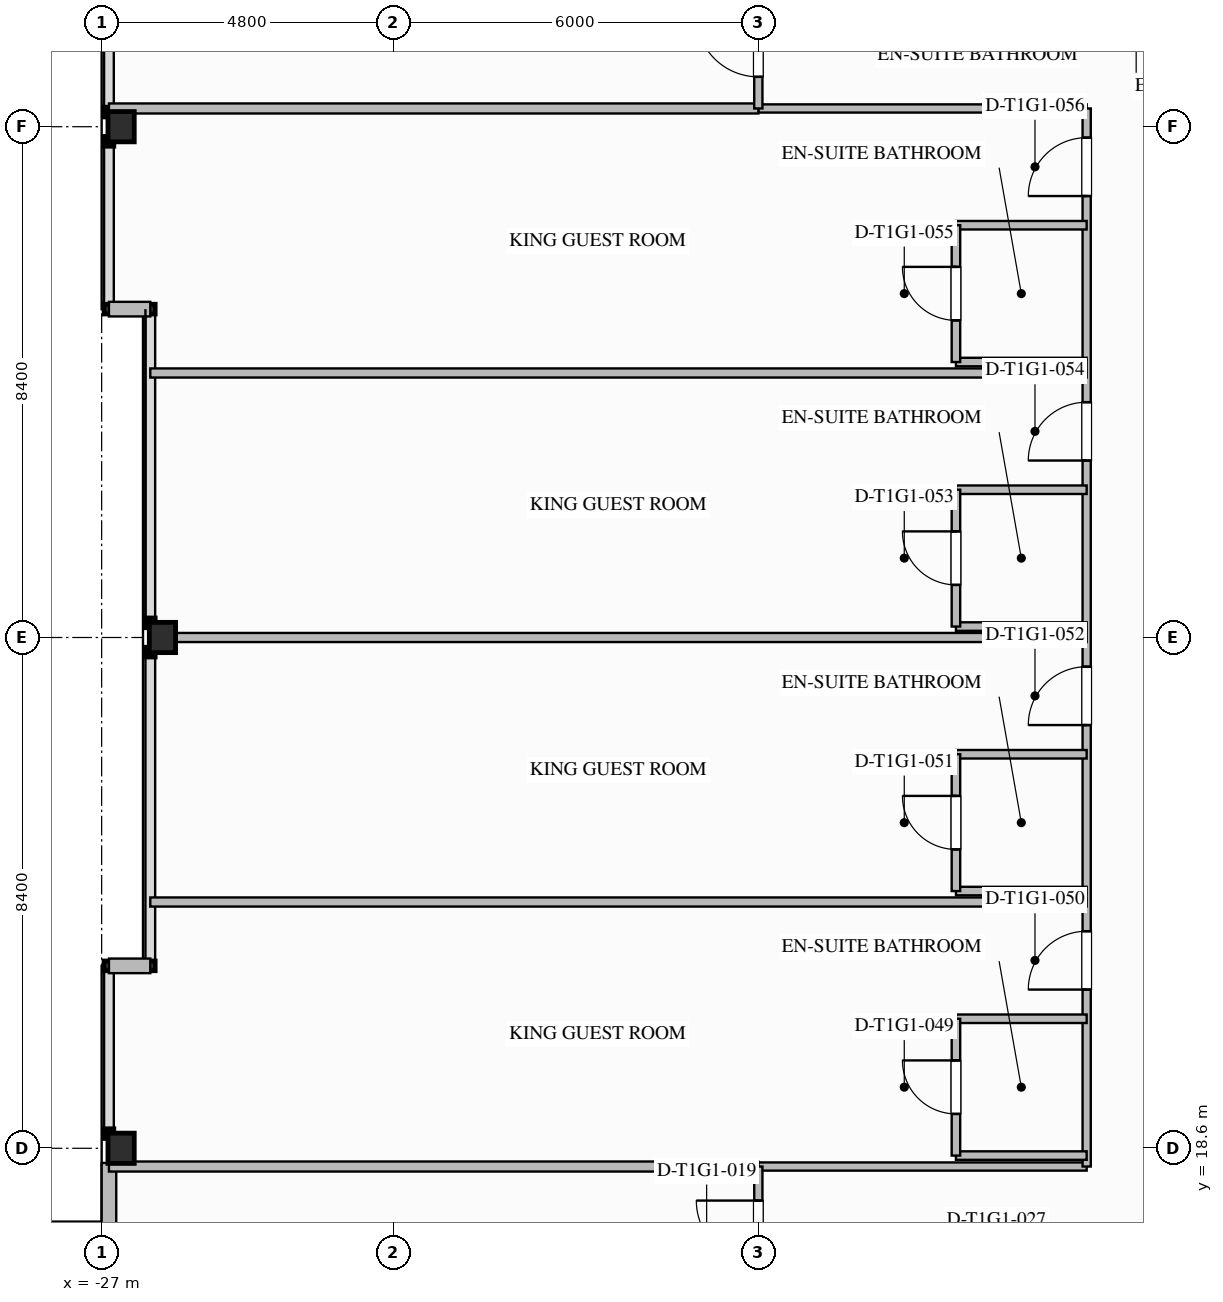
"""IFC4 building model, lengths in metres.
Left out: names, types, materials, properties, quantities, classifications, styles, units other than length and angle.
Written with IfcOpenShell. Run it as: python <this file> out.ifc"""

import sys

from ifc_helpers import new_model, si_unit, direction, frame, frame_2d, origin, origin_2d, place, context, subcontext, project, spatial, rectangle, i_section, extrude, element, fill, save


model = new_model("IFC4")
c1 = context("Model", 3, precision=1e-05, world=origin(), true_north=direction((0.0, 1.0)))
c2 = subcontext(c1, "Body", "Model", "MODEL_VIEW")
j1 = project(units=[si_unit("LENGTHUNIT", "METRE"), si_unit("PLANEANGLEUNIT", "RADIAN")], contexts=[c1])
p1 = place(None, origin())
s1 = spatial("IfcSite", under=j1, at=p1, CompositionType="ELEMENT")
p2 = place(p1, origin())
s2 = spatial("IfcBuilding", under=s1, at=p2, CompositionType="ELEMENT")
p3 = place(p2, frame((0.0, 0.0, 36.7)))
s3 = spatial("IfcBuildingStorey", under=s2, at=p3, CompositionType="ELEMENT", Elevation=36.7)
for number, where, z_axis, x_axis in (
    (1, (-26.68, 18.6, 0.0), (0.0, 0.0, 1.0), (1.0, 0.0, 0.0)),
    (2, (-26.0, 27.0, 0.0), (0.0, 0.0, 1.0), (1.0, 0.0, 0.0)),
    (3, (-26.68, 35.4, 0.0), (0.0, 0.0, 1.0), (1.0, 0.0, 0.0)),
):
    element("IfcColumn", number, at=place(p3, frame(where, z_axis=z_axis, x_axis=x_axis)), inside=s3, PredefinedType="COLUMN", context=c2, shape_type="SweptSolid", body=[
        extrude(i_section(OverallWidth=0.432, OverallDepth=0.498, WebThickness=0.056, FlangeThickness=0.089, FilletRadius=0.03, at=origin_2d()), origin(), (0.0, 0.0, 1.0), 3.497),
    ])
p4 = place(p3, frame((-26.88, 11.041, 0.0), z_axis=(0.0, 0.0, 1.0), x_axis=(0.0, 1.0, 0.0)))
e4 = element("IfcWall", 4, at=p4, inside=s3, PredefinedType="STANDARD", context=c2, shape_type="SweptSolid", body=[
    extrude(rectangle(XDim=7.318, YDim=0.24, at=frame_2d((3.659, 0.0))), origin(), (0.0, 0.0, 1.0), 2.629),
])
p5 = place(p4, frame((4.559, 0.0, 0.0)))
e5 = element("IfcOpeningElement", 5, at=p5, cuts=e4, PredefinedType="OPENING", context=c2, shape_type="SweptSolid", body=[
    extrude(rectangle(XDim=1.0, YDim=2.2, at=frame_2d((0.5, 1.1))), frame((0.0, 0.13, 0.0), z_axis=(0.0, -1.0, 0.0), x_axis=(1.0, 0.0, 0.0)), (0.0, 0.0, 1.0), 0.26),
])
p6 = place(p4, frame((1.552, 0.0, 0.75)))
e6 = element("IfcOpeningElement", 6, at=p6, cuts=e4, PredefinedType="OPENING", context=c2, shape_type="SweptSolid", body=[
    extrude(rectangle(XDim=1.8, YDim=1.779, at=frame_2d((0.9, 0.89))), frame((0.0, 0.13, 0.0), z_axis=(0.0, -1.0, 0.0), x_axis=(1.0, 0.0, 0.0)), (0.0, 0.0, 1.0), 0.26),
])
for number, where, z_axis, x_axis in (
    (7, (-26.88, 21.6, 0.0), (0.0, 0.0, 1.0), (1.0, 0.0, 0.0)),
    (8, (-26.2, 32.4, 0.0), (0.0, 0.0, 1.0), (-1.0, 0.0, 0.0)),
):
    element("IfcWall", number, at=place(p3, frame(where, z_axis=z_axis, x_axis=x_axis)), inside=s3, PredefinedType="STANDARD", context=c2, shape_type="SweptSolid", body=[
        extrude(rectangle(XDim=0.68, YDim=0.24, at=frame_2d((0.34, 0.0))), origin(), (0.0, 0.0, 1.0), 3.24),
    ])
for number, where, z_axis, x_axis in (
    (9, (-16.2, 18.3, 0.0), (0.0, 0.0, 1.0), (1.0, 0.0, 0.0)),
    (10, (-16.2, 35.7, 0.0), (0.0, 0.0, 1.0), (1.0, 0.0, 0.0)),
):
    element("IfcWall", number, at=place(p3, frame(where, z_axis=z_axis, x_axis=x_axis)), inside=s3, PredefinedType="PARTITIONING", context=c2, shape_type="SweptSolid", body=[
        extrude(rectangle(XDim=5.4, YDim=0.135, at=frame_2d((2.7, 0.0))), origin(), (0.0, 0.0, 1.0), 3.24),
    ])
p7 = place(p3, frame((-10.8, 18.3, 0.0), z_axis=(0.0, 0.0, 1.0), x_axis=(0.0, 1.0, 0.0)))
e11 = element("IfcWall", 11, at=p7, inside=s3, PredefinedType="PARTITIONING", context=c2, shape_type="SweptSolid", body=[
    extrude(rectangle(XDim=17.4, YDim=0.135, at=frame_2d((8.7, 0.0))), origin(), (0.0, 0.0, 1.0), 3.24),
])
p8 = place(p7, frame((2.91, 0.0, 0.0)))
e12 = element("IfcOpeningElement", 12, at=p8, cuts=e11, PredefinedType="OPENING", context=c2, shape_type="SweptSolid", body=[
    extrude(rectangle(XDim=0.96, YDim=2.15, at=frame_2d((0.48, 1.075))), frame((0.0, 0.077, 0.0), z_axis=(0.0, -1.0, 0.0), x_axis=(1.0, 0.0, 0.0)), (0.0, 0.0, 1.0), 0.155),
])
p9 = place(p7, frame((7.26, 0.0, 0.0)))
e13 = element("IfcOpeningElement", 13, at=p9, cuts=e11, PredefinedType="OPENING", context=c2, shape_type="SweptSolid", body=[
    extrude(rectangle(XDim=0.96, YDim=2.15, at=frame_2d((0.48, 1.075))), frame((0.0, 0.077, 0.0), z_axis=(0.0, -1.0, 0.0), x_axis=(1.0, 0.0, 0.0)), (0.0, 0.0, 1.0), 0.155),
])
p10 = place(p7, frame((11.61, 0.0, 0.0)))
e14 = element("IfcOpeningElement", 14, at=p10, cuts=e11, PredefinedType="OPENING", context=c2, shape_type="SweptSolid", body=[
    extrude(rectangle(XDim=0.96, YDim=2.15, at=frame_2d((0.48, 1.075))), frame((0.0, 0.077, 0.0), z_axis=(0.0, -1.0, 0.0), x_axis=(1.0, 0.0, 0.0)), (0.0, 0.0, 1.0), 0.155),
])
p11 = place(p7, frame((15.96, 0.0, 0.0)))
e15 = element("IfcOpeningElement", 15, at=p11, cuts=e11, PredefinedType="OPENING", context=c2, shape_type="SweptSolid", body=[
    extrude(rectangle(XDim=0.96, YDim=2.15, at=frame_2d((0.48, 1.075))), frame((0.0, 0.077, 0.0), z_axis=(0.0, -1.0, 0.0), x_axis=(1.0, 0.0, 0.0)), (0.0, 0.0, 1.0), 0.155),
])
for number, where, z_axis, x_axis in (
    (16, (-26.88, 18.3, 0.0), (0.0, 0.0, 1.0), (1.0, 0.0, 0.0)),
    (17, (-26.88, 35.7, 0.0), (0.0, 0.0, 1.0), (1.0, 0.0, 0.0)),
):
    element("IfcWall", number, at=place(p3, frame(where, z_axis=z_axis, x_axis=x_axis)), inside=s3, PredefinedType="PARTITIONING", context=c2, shape_type="SweptSolid", body=[
        extrude(rectangle(XDim=10.68, YDim=0.165, at=frame_2d((5.34, 0.0))), origin(), (0.0, 0.0, 1.0), 2.298),
    ])
p12 = place(p3, frame((-16.2, 16.2, 0.0), z_axis=(0.0, 0.0, 1.0), x_axis=(0.0, 1.0, 0.0)))
e18 = element("IfcWall", 18, at=p12, inside=s3, PredefinedType="PARTITIONING", context=c2, shape_type="SweptSolid", body=[
    extrude(rectangle(XDim=2.1, YDim=0.135, at=frame_2d((1.05, 0.0))), origin(), (0.0, 0.0, 1.0), 2.298),
])
p13 = place(p12, frame((0.52, 0.0, 0.0)))
e19 = element("IfcOpeningElement", 19, at=p13, cuts=e18, PredefinedType="OPENING", context=c2, shape_type="SweptSolid", body=[
    extrude(rectangle(XDim=1.02, YDim=2.15, at=frame_2d((0.51, 1.075))), frame((0.0, 0.077, 0.0), z_axis=(0.0, -1.0, 0.0), x_axis=(1.0, 0.0, 0.0)), (0.0, 0.0, 1.0), 0.155),
])
p14 = place(p3, frame((-16.2, 35.7, 0.0), z_axis=(0.0, 0.0, 1.0), x_axis=(0.0, 1.0, 0.0)))
e20 = element("IfcWall", 20, at=p14, inside=s3, PredefinedType="PARTITIONING", context=c2, shape_type="SweptSolid", body=[
    extrude(rectangle(XDim=2.1, YDim=0.135, at=frame_2d((1.05, 0.0))), origin(), (0.0, 0.0, 1.0), 2.298),
])
p15 = place(p14, frame((0.52, 0.0, 0.0)))
e21 = element("IfcOpeningElement", 21, at=p15, cuts=e20, PredefinedType="OPENING", context=c2, shape_type="SweptSolid", body=[
    extrude(rectangle(XDim=1.02, YDim=2.15, at=frame_2d((0.51, 1.075))), frame((0.0, 0.077, 0.0), z_axis=(0.0, -1.0, 0.0), x_axis=(1.0, 0.0, 0.0)), (0.0, 0.0, 1.0), 0.155),
])
p16 = place(p3, frame((-10.8, 18.48, 0.0), z_axis=(0.0, 0.0, 1.0), x_axis=(-1.0, 0.0, 0.0)))
e22 = element("IfcWall", 22, at=p16, inside=s3, PredefinedType="PLUMBINGWALL", context=c2, shape_type="SweptSolid", body=[
    extrude(rectangle(XDim=2.15, YDim=0.14, at=frame_2d((1.075, 0.0))), origin(), (0.0, 0.0, 1.0), 2.617),
])
p17 = place(p3, frame((-10.8, 20.73, 0.0), z_axis=(0.0, 0.0, 1.0), x_axis=(-1.0, 0.0, 0.0)))
e23 = element("IfcWall", 23, at=p17, inside=s3, PredefinedType="PLUMBINGWALL", context=c2, shape_type="SweptSolid", body=[
    extrude(rectangle(XDim=2.15, YDim=0.14, at=frame_2d((1.075, 0.0))), origin(), (0.0, 0.0, 1.0), 3.24),
])
p18 = place(p3, frame((-12.95, 18.48, 0.0), z_axis=(0.0, 0.0, 1.0), x_axis=(0.0, 1.0, 0.0)))
e24 = element("IfcWall", 24, at=p18, inside=s3, PredefinedType="PLUMBINGWALL", context=c2, shape_type="SweptSolid", body=[
    extrude(rectangle(XDim=2.25, YDim=0.14, at=frame_2d((1.125, 0.0))), origin(), (0.0, 0.0, 1.0), 3.24),
])
p19 = place(p18, frame((0.685, 0.0, 0.0)))
e25 = element("IfcOpeningElement", 25, at=p19, cuts=e24, PredefinedType="OPENING", context=c2, shape_type="SweptSolid", body=[
    extrude(rectangle(XDim=0.88, YDim=2.1, at=frame_2d((0.44, 1.05))), frame((0.0, 0.08, 0.0), z_axis=(0.0, -1.0, 0.0), x_axis=(1.0, 0.0, 0.0)), (0.0, 0.0, 1.0), 0.16),
])
p20 = place(p3, frame((-26.2, 22.65, 0.0), z_axis=(0.0, 0.0, 1.0), x_axis=(1.0, 0.0, 0.0)))
e26 = element("IfcWall", 26, at=p20, inside=s3, PredefinedType="PARTITIONING", context=c2, shape_type="SweptSolid", body=[
    extrude(rectangle(XDim=15.4, YDim=0.15, at=frame_2d((7.7, 0.0))), origin(), (0.0, 0.0, 1.0), 3.24),
])
for number, where, z_axis, x_axis in (
    (27, (-10.8, 22.83, 0.0), (0.0, 0.0, 1.0), (-1.0, 0.0, 0.0)),
    (28, (-10.8, 25.08, 0.0), (0.0, 0.0, 1.0), (-1.0, 0.0, 0.0)),
):
    element("IfcWall", number, at=place(p3, frame(where, z_axis=z_axis, x_axis=x_axis)), inside=s3, PredefinedType="PLUMBINGWALL", context=c2, shape_type="SweptSolid", body=[
        extrude(rectangle(XDim=2.15, YDim=0.14, at=frame_2d((1.075, 0.0))), origin(), (0.0, 0.0, 1.0), 3.24),
    ])
p21 = place(p3, frame((-12.95, 22.83, 0.0), z_axis=(0.0, 0.0, 1.0), x_axis=(0.0, 1.0, 0.0)))
e29 = element("IfcWall", 29, at=p21, inside=s3, PredefinedType="PLUMBINGWALL", context=c2, shape_type="SweptSolid", body=[
    extrude(rectangle(XDim=2.25, YDim=0.14, at=frame_2d((1.125, 0.0))), origin(), (0.0, 0.0, 1.0), 3.24),
])
p22 = place(p21, frame((0.685, 0.0, 0.0)))
e30 = element("IfcOpeningElement", 30, at=p22, cuts=e29, PredefinedType="OPENING", context=c2, shape_type="SweptSolid", body=[
    extrude(rectangle(XDim=0.88, YDim=2.1, at=frame_2d((0.44, 1.05))), frame((0.0, 0.08, 0.0), z_axis=(0.0, -1.0, 0.0), x_axis=(1.0, 0.0, 0.0)), (0.0, 0.0, 1.0), 0.16),
])
p23 = place(p3, frame((-26.2, 27.0, 0.0), z_axis=(0.0, 0.0, 1.0), x_axis=(1.0, 0.0, 0.0)))
e31 = element("IfcWall", 31, at=p23, inside=s3, PredefinedType="PARTITIONING", context=c2, shape_type="SweptSolid", body=[
    extrude(rectangle(XDim=15.4, YDim=0.15, at=frame_2d((7.7, 0.0))), origin(), (0.0, 0.0, 1.0), 2.298),
])
p24 = place(p3, frame((-10.8, 27.18, 0.0), z_axis=(0.0, 0.0, 1.0), x_axis=(-1.0, 0.0, 0.0)))
e32 = element("IfcWall", 32, at=p24, inside=s3, PredefinedType="PLUMBINGWALL", context=c2, shape_type="SweptSolid", body=[
    extrude(rectangle(XDim=2.15, YDim=0.14, at=frame_2d((1.075, 0.0))), origin(), (0.0, 0.0, 1.0), 2.617),
])
p25 = place(p3, frame((-10.8, 29.43, 0.0), z_axis=(0.0, 0.0, 1.0), x_axis=(-1.0, 0.0, 0.0)))
e33 = element("IfcWall", 33, at=p25, inside=s3, PredefinedType="PLUMBINGWALL", context=c2, shape_type="SweptSolid", body=[
    extrude(rectangle(XDim=2.15, YDim=0.14, at=frame_2d((1.075, 0.0))), origin(), (0.0, 0.0, 1.0), 3.24),
])
p26 = place(p3, frame((-12.95, 27.18, 0.0), z_axis=(0.0, 0.0, 1.0), x_axis=(0.0, 1.0, 0.0)))
e34 = element("IfcWall", 34, at=p26, inside=s3, PredefinedType="PLUMBINGWALL", context=c2, shape_type="SweptSolid", body=[
    extrude(rectangle(XDim=2.25, YDim=0.14, at=frame_2d((1.125, 0.0))), origin(), (0.0, 0.0, 1.0), 3.24),
])
p27 = place(p26, frame((0.685, 0.0, 0.0)))
e35 = element("IfcOpeningElement", 35, at=p27, cuts=e34, PredefinedType="OPENING", context=c2, shape_type="SweptSolid", body=[
    extrude(rectangle(XDim=0.88, YDim=2.1, at=frame_2d((0.44, 1.05))), frame((0.0, 0.08, 0.0), z_axis=(0.0, -1.0, 0.0), x_axis=(1.0, 0.0, 0.0)), (0.0, 0.0, 1.0), 0.16),
])
p28 = place(p3, frame((-26.2, 31.35, 0.0), z_axis=(0.0, 0.0, 1.0), x_axis=(1.0, 0.0, 0.0)))
e36 = element("IfcWall", 36, at=p28, inside=s3, PredefinedType="PARTITIONING", context=c2, shape_type="SweptSolid", body=[
    extrude(rectangle(XDim=15.4, YDim=0.15, at=frame_2d((7.7, 0.0))), origin(), (0.0, 0.0, 1.0), 3.24),
])
for number, where, z_axis, x_axis in (
    (37, (-10.8, 31.53, 0.0), (0.0, 0.0, 1.0), (-1.0, 0.0, 0.0)),
    (38, (-10.8, 33.78, 0.0), (0.0, 0.0, 1.0), (-1.0, 0.0, 0.0)),
):
    element("IfcWall", number, at=place(p3, frame(where, z_axis=z_axis, x_axis=x_axis)), inside=s3, PredefinedType="PLUMBINGWALL", context=c2, shape_type="SweptSolid", body=[
        extrude(rectangle(XDim=2.15, YDim=0.14, at=frame_2d((1.075, 0.0))), origin(), (0.0, 0.0, 1.0), 3.24),
    ])
p29 = place(p3, frame((-12.95, 31.53, 0.0), z_axis=(0.0, 0.0, 1.0), x_axis=(0.0, 1.0, 0.0)))
e39 = element("IfcWall", 39, at=p29, inside=s3, PredefinedType="PLUMBINGWALL", context=c2, shape_type="SweptSolid", body=[
    extrude(rectangle(XDim=2.25, YDim=0.14, at=frame_2d((1.125, 0.0))), origin(), (0.0, 0.0, 1.0), 3.24),
])
p30 = place(p29, frame((0.685, 0.0, 0.0)))
e40 = element("IfcOpeningElement", 40, at=p30, cuts=e39, PredefinedType="OPENING", context=c2, shape_type="SweptSolid", body=[
    extrude(rectangle(XDim=0.88, YDim=2.1, at=frame_2d((0.44, 1.05))), frame((0.0, 0.08, 0.0), z_axis=(0.0, -1.0, 0.0), x_axis=(1.0, 0.0, 0.0)), (0.0, 0.0, 1.0), 0.16),
])
p31 = place(p13, origin())
e41 = element("IfcDoor", 41, at=p31, inside=s3, OperationType="SINGLE_SWING_RIGHT", PredefinedType="DOOR", context=c2, shape_type="SweptSolid", body=[
    extrude(rectangle(XDim=1.02, YDim=2.15, at=frame_2d((0.51, 1.075))), frame((0.0, 0.025, 0.0), z_axis=(0.0, -1.0, 0.0), x_axis=(1.0, 0.0, 0.0)), (0.0, 0.0, 1.0), 0.05),
])
fill(e19, e41)
p32 = place(p15, origin())
e42 = element("IfcDoor", 42, at=p32, inside=s3, OperationType="SINGLE_SWING_RIGHT", PredefinedType="DOOR", context=c2, shape_type="SweptSolid", body=[
    extrude(rectangle(XDim=1.02, YDim=2.15, at=frame_2d((0.51, 1.075))), frame((0.0, 0.025, 0.0), z_axis=(0.0, -1.0, 0.0), x_axis=(1.0, 0.0, 0.0)), (0.0, 0.0, 1.0), 0.05),
])
fill(e21, e42)
p33 = place(p19, origin())
e43 = element("IfcDoor", 43, at=p33, inside=s3, OperationType="SINGLE_SWING_RIGHT", PredefinedType="DOOR", context=c2, shape_type="SweptSolid", body=[
    extrude(rectangle(XDim=0.88, YDim=2.1, at=frame_2d((0.44, 1.05))), frame((0.0, 0.025, 0.0), z_axis=(0.0, -1.0, 0.0), x_axis=(1.0, 0.0, 0.0)), (0.0, 0.0, 1.0), 0.05),
])
fill(e25, e43)
p34 = place(p8, origin())
e44 = element("IfcDoor", 44, at=p34, inside=s3, OperationType="SINGLE_SWING_LEFT", PredefinedType="DOOR", context=c2, shape_type="SweptSolid", body=[
    extrude(rectangle(XDim=0.96, YDim=2.15, at=frame_2d((0.48, 1.075))), frame((0.0, 0.025, 0.0), z_axis=(0.0, -1.0, 0.0), x_axis=(1.0, 0.0, 0.0)), (0.0, 0.0, 1.0), 0.05),
])
fill(e12, e44)
p35 = place(p22, origin())
e45 = element("IfcDoor", 45, at=p35, inside=s3, OperationType="SINGLE_SWING_RIGHT", PredefinedType="DOOR", context=c2, shape_type="SweptSolid", body=[
    extrude(rectangle(XDim=0.88, YDim=2.1, at=frame_2d((0.44, 1.05))), frame((0.0, 0.025, 0.0), z_axis=(0.0, -1.0, 0.0), x_axis=(1.0, 0.0, 0.0)), (0.0, 0.0, 1.0), 0.05),
])
fill(e30, e45)
p36 = place(p9, origin())
e46 = element("IfcDoor", 46, at=p36, inside=s3, OperationType="SINGLE_SWING_LEFT", PredefinedType="DOOR", context=c2, shape_type="SweptSolid", body=[
    extrude(rectangle(XDim=0.96, YDim=2.15, at=frame_2d((0.48, 1.075))), frame((0.0, 0.025, 0.0), z_axis=(0.0, -1.0, 0.0), x_axis=(1.0, 0.0, 0.0)), (0.0, 0.0, 1.0), 0.05),
])
fill(e13, e46)
p37 = place(p27, origin())
e47 = element("IfcDoor", 47, at=p37, inside=s3, OperationType="SINGLE_SWING_RIGHT", PredefinedType="DOOR", context=c2, shape_type="SweptSolid", body=[
    extrude(rectangle(XDim=0.88, YDim=2.1, at=frame_2d((0.44, 1.05))), frame((0.0, 0.025, 0.0), z_axis=(0.0, -1.0, 0.0), x_axis=(1.0, 0.0, 0.0)), (0.0, 0.0, 1.0), 0.05),
])
fill(e35, e47)
p38 = place(p10, origin())
e48 = element("IfcDoor", 48, at=p38, inside=s3, OperationType="SINGLE_SWING_LEFT", PredefinedType="DOOR", context=c2, shape_type="SweptSolid", body=[
    extrude(rectangle(XDim=0.96, YDim=2.15, at=frame_2d((0.48, 1.075))), frame((0.0, 0.025, 0.0), z_axis=(0.0, -1.0, 0.0), x_axis=(1.0, 0.0, 0.0)), (0.0, 0.0, 1.0), 0.05),
])
fill(e14, e48)
p39 = place(p30, origin())
e49 = element("IfcDoor", 49, at=p39, inside=s3, OperationType="SINGLE_SWING_RIGHT", PredefinedType="DOOR", context=c2, shape_type="SweptSolid", body=[
    extrude(rectangle(XDim=0.88, YDim=2.1, at=frame_2d((0.44, 1.05))), frame((0.0, 0.025, 0.0), z_axis=(0.0, -1.0, 0.0), x_axis=(1.0, 0.0, 0.0)), (0.0, 0.0, 1.0), 0.05),
])
fill(e40, e49)
p40 = place(p11, origin())
e50 = element("IfcDoor", 50, at=p40, inside=s3, OperationType="SINGLE_SWING_LEFT", PredefinedType="DOOR", context=c2, shape_type="SweptSolid", body=[
    extrude(rectangle(XDim=0.96, YDim=2.15, at=frame_2d((0.48, 1.075))), frame((0.0, 0.025, 0.0), z_axis=(0.0, -1.0, 0.0), x_axis=(1.0, 0.0, 0.0)), (0.0, 0.0, 1.0), 0.05),
])
fill(e15, e50)
save(model, sys.argv[1])
